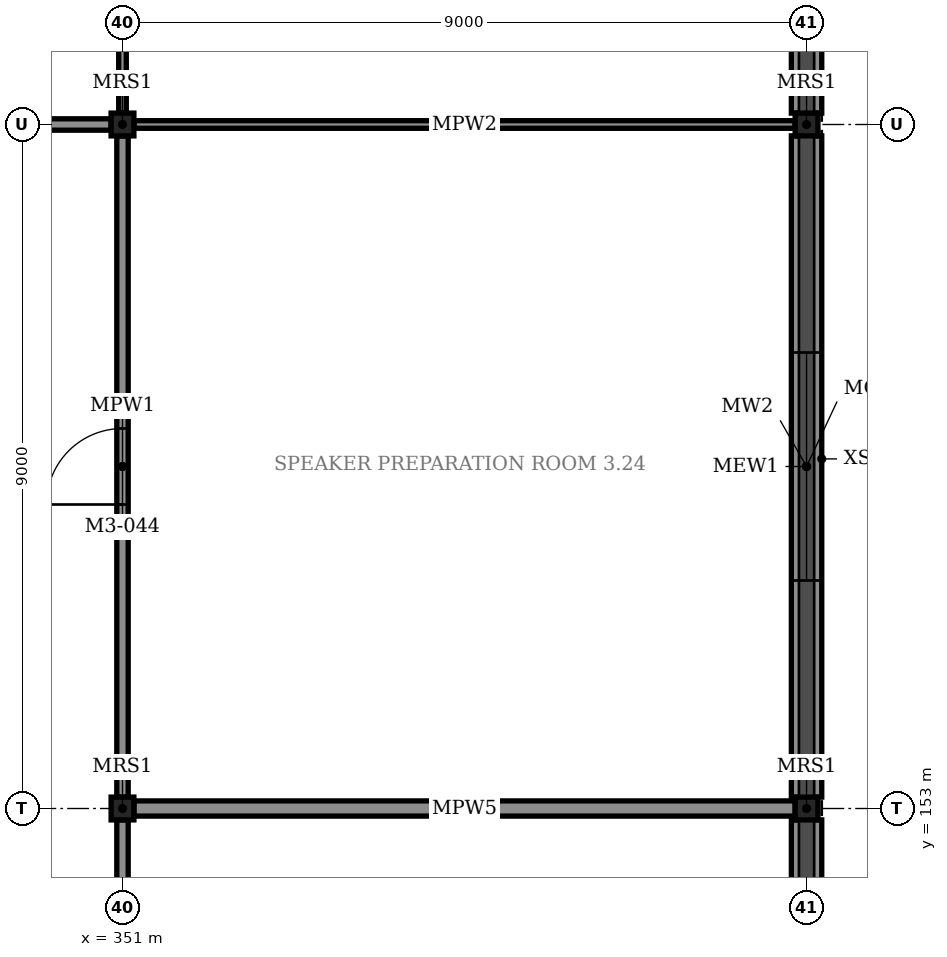
"""IFC4 building model, lengths in metres.
Left out: names, types, materials, properties, quantities, classifications, styles, units other than length and angle.
Written with IfcOpenShell. Run it as: python <this file> out.ifc"""

import sys

from ifc_helpers import new_model, si_unit, direction, frame, frame_2d, origin, origin_2d, place, context, subcontext, project, spatial, rectangle, hollow_rectangle, extrude, element, fill, save


model = new_model("IFC4")
c1 = context("Model", 3, precision=1e-05, world=origin(), true_north=direction((0.0, 1.0)))
c2 = subcontext(c1, "Body", "Model", "MODEL_VIEW")
j1 = project(units=[si_unit("LENGTHUNIT", "METRE"), si_unit("PLANEANGLEUNIT", "RADIAN")], contexts=[c1])
p1 = place(None, origin())
s1 = spatial("IfcSite", under=j1, at=p1, CompositionType="ELEMENT")
p2 = place(p1, origin())
s2 = spatial("IfcBuilding", under=s1, at=p2, CompositionType="ELEMENT")
p3 = place(p2, frame((0.0, 0.0, 17.0)))
s3 = spatial("IfcBuildingStorey", under=s2, at=p3, CompositionType="ELEMENT", Elevation=17.0)
for number, where, z_axis, x_axis in (
    (1, (351.0, 153.0, 0.0), (0.0, 0.0, 1.0), (1.0, 0.0, 0.0)),
    (2, (351.0, 162.0, 0.0), (0.0, 0.0, 1.0), (1.0, 0.0, 0.0)),
    (3, (360.0, 153.0, 0.0), (0.0, 0.0, 1.0), (1.0, 0.0, 0.0)),
    (4, (360.0, 162.0, 0.0), (0.0, 0.0, 1.0), (1.0, 0.0, 0.0)),
):
    element("IfcColumn", number, at=place(p3, frame(where, z_axis=z_axis, x_axis=x_axis)), inside=s3, PredefinedType="COLUMN", context=c2, shape_type="SweptSolid", body=[
        extrude(hollow_rectangle(XDim=0.3, YDim=0.3, WallThickness=0.012, InnerFilletRadius=0.024, OuterFilletRadius=0.036, at=origin_2d()), origin(), (0.0, 0.0, 1.0), 3.1),
    ])
p4 = place(p3, frame((360.0, 144.15, 0.0), z_axis=(0.0, 0.0, 1.0), x_axis=(0.0, 1.0, 0.0)))
e5 = element("IfcWall", 5, at=p4, inside=s3, PredefinedType="STANDARD", context=c2, shape_type="SweptSolid", body=[
    extrude(rectangle(XDim=8.7, YDim=0.4, at=frame_2d((4.35, 0.0))), origin(), (0.0, 0.0, 1.0), 3.3),
])
p5 = place(p4, frame((2.85, 0.0, 0.9)))
e6 = element("IfcOpeningElement", 6, at=p5, cuts=e5, PredefinedType="OPENING", context=c2, shape_type="SweptSolid", body=[
    extrude(rectangle(XDim=3.0, YDim=2.1, at=frame_2d((1.5, 1.05))), frame((0.0, 0.21, 0.0), z_axis=(0.0, -1.0, 0.0), x_axis=(1.0, 0.0, 0.0)), (0.0, 0.0, 1.0), 0.42),
])
p6 = place(p3, frame((360.0, 153.15, 0.0), z_axis=(0.0, 0.0, 1.0), x_axis=(0.0, 1.0, 0.0)))
e7 = element("IfcWall", 7, at=p6, inside=s3, PredefinedType="STANDARD", context=c2, shape_type="SweptSolid", body=[
    extrude(rectangle(XDim=8.7, YDim=0.4, at=frame_2d((4.35, 0.0))), origin(), (0.0, 0.0, 1.0), 3.3),
])
p7 = place(p6, frame((2.85, 0.0, 0.9)))
e8 = element("IfcOpeningElement", 8, at=p7, cuts=e7, PredefinedType="OPENING", context=c2, shape_type="SweptSolid", body=[
    extrude(rectangle(XDim=3.0, YDim=2.1, at=frame_2d((1.5, 1.05))), frame((0.0, 0.21, 0.0), z_axis=(0.0, -1.0, 0.0), x_axis=(1.0, 0.0, 0.0)), (0.0, 0.0, 1.0), 0.42),
])
p8 = place(p3, frame((360.0, 162.15, 0.0), z_axis=(0.0, 0.0, 1.0), x_axis=(0.0, 1.0, 0.0)))
e9 = element("IfcWall", 9, at=p8, inside=s3, PredefinedType="STANDARD", context=c2, shape_type="SweptSolid", body=[
    extrude(rectangle(XDim=8.7, YDim=0.4, at=frame_2d((4.35, 0.0))), origin(), (0.0, 0.0, 1.0), 3.3),
])
p9 = place(p8, frame((1.763, 0.0, 0.9)))
e10 = element("IfcOpeningElement", 10, at=p9, cuts=e9, PredefinedType="OPENING", context=c2, shape_type="SweptSolid", body=[
    extrude(rectangle(XDim=3.0, YDim=2.1, at=frame_2d((1.5, 1.05))), frame((0.0, 0.21, 0.0), z_axis=(0.0, -1.0, 0.0), x_axis=(1.0, 0.0, 0.0)), (0.0, 0.0, 1.0), 0.42),
])
p10 = place(p3, frame((342.15, 162.0, 0.0), z_axis=(0.0, 0.0, 1.0), x_axis=(1.0, 0.0, 0.0)))
e11 = element("IfcWall", 11, at=p10, inside=s3, PredefinedType="PARTITIONING", context=c2, shape_type="SweptSolid", body=[
    extrude(rectangle(XDim=8.7, YDim=0.15, at=frame_2d((4.35, 0.0))), origin(), (0.0, 0.0, 1.0), 3.0),
])
p11 = place(p3, frame((351.0, 162.15, 0.0), z_axis=(0.0, 0.0, 1.0), x_axis=(0.0, 1.0, 0.0)))
e12 = element("IfcWall", 12, at=p11, inside=s3, PredefinedType="PARTITIONING", context=c2, shape_type="SweptSolid", body=[
    extrude(rectangle(XDim=6.525, YDim=0.1, at=frame_2d((3.263, 0.0))), origin(), (0.0, 0.0, 1.0), 3.0),
])
p12 = place(p3, frame((351.15, 153.0, 0.0), z_axis=(0.0, 0.0, 1.0), x_axis=(1.0, 0.0, 0.0)))
e13 = element("IfcWall", 13, at=p12, inside=s3, PredefinedType="PARTITIONING", context=c2, shape_type="SweptSolid", body=[
    extrude(rectangle(XDim=8.7, YDim=0.2, at=frame_2d((4.35, 0.0))), origin(), (0.0, 0.0, 1.0), 3.0),
])
p13 = place(p3, frame((351.0, 144.15, 0.0), z_axis=(0.0, 0.0, 1.0), x_axis=(0.0, 1.0, 0.0)))
e14 = element("IfcWall", 14, at=p13, inside=s3, PredefinedType="PARTITIONING", context=c2, shape_type="SweptSolid", body=[
    extrude(rectangle(XDim=8.7, YDim=0.15, at=frame_2d((4.35, 0.0))), origin(), (0.0, 0.0, 1.0), 3.0),
])
p14 = place(p3, frame((351.15, 162.0, 0.0), z_axis=(0.0, 0.0, 1.0), x_axis=(1.0, 0.0, 0.0)))
e15 = element("IfcWall", 15, at=p14, inside=s3, PredefinedType="PARTITIONING", context=c2, shape_type="SweptSolid", body=[
    extrude(rectangle(XDim=8.7, YDim=0.1, at=frame_2d((4.35, 0.0))), origin(), (0.0, 0.0, 1.0), 3.0),
])
p15 = place(p3, frame((351.0, 153.15, 0.0), z_axis=(0.0, 0.0, 1.0), x_axis=(0.0, 1.0, 0.0)))
e16 = element("IfcWall", 16, at=p15, inside=s3, PredefinedType="PARTITIONING", context=c2, shape_type="SweptSolid", body=[
    extrude(rectangle(XDim=8.7, YDim=0.15, at=frame_2d((4.35, 0.0))), origin(), (0.0, 0.0, 1.0), 3.0),
])
p16 = place(p15, frame((3.85, 0.0, 0.0)))
e17 = element("IfcOpeningElement", 17, at=p16, cuts=e16, PredefinedType="OPENING", context=c2, shape_type="SweptSolid", body=[
    extrude(rectangle(XDim=1.0, YDim=2.4, at=frame_2d((0.5, 1.2))), frame((0.0, 0.085, 0.0), z_axis=(0.0, -1.0, 0.0), x_axis=(1.0, 0.0, 0.0)), (0.0, 0.0, 1.0), 0.17),
])
p17 = place(p7, origin())
e18 = element("IfcWindow", 18, at=p17, inside=s3, PartitioningType="TRIPLE_PANEL_VERTICAL", PredefinedType="WINDOW", context=c2, shape_type="SweptSolid", body=[
    extrude(rectangle(XDim=3.0, YDim=2.1, at=frame_2d((1.5, 1.05))), frame((0.0, 0.03, 0.0), z_axis=(0.0, -1.0, 0.0), x_axis=(1.0, 0.0, 0.0)), (0.0, 0.0, 1.0), 0.06),
])
fill(e8, e18)
p18 = place(p16, origin())
e19 = element("IfcDoor", 19, at=p18, inside=s3, OperationType="SINGLE_SWING_LEFT", PredefinedType="DOOR", context=c2, shape_type="SweptSolid", body=[
    extrude(rectangle(XDim=1.0, YDim=2.4, at=frame_2d((0.5, 1.2))), frame((0.0, 0.025, 0.0), z_axis=(0.0, -1.0, 0.0), x_axis=(1.0, 0.0, 0.0)), (0.0, 0.0, 1.0), 0.05),
])
fill(e17, e19)
save(model, sys.argv[1])
